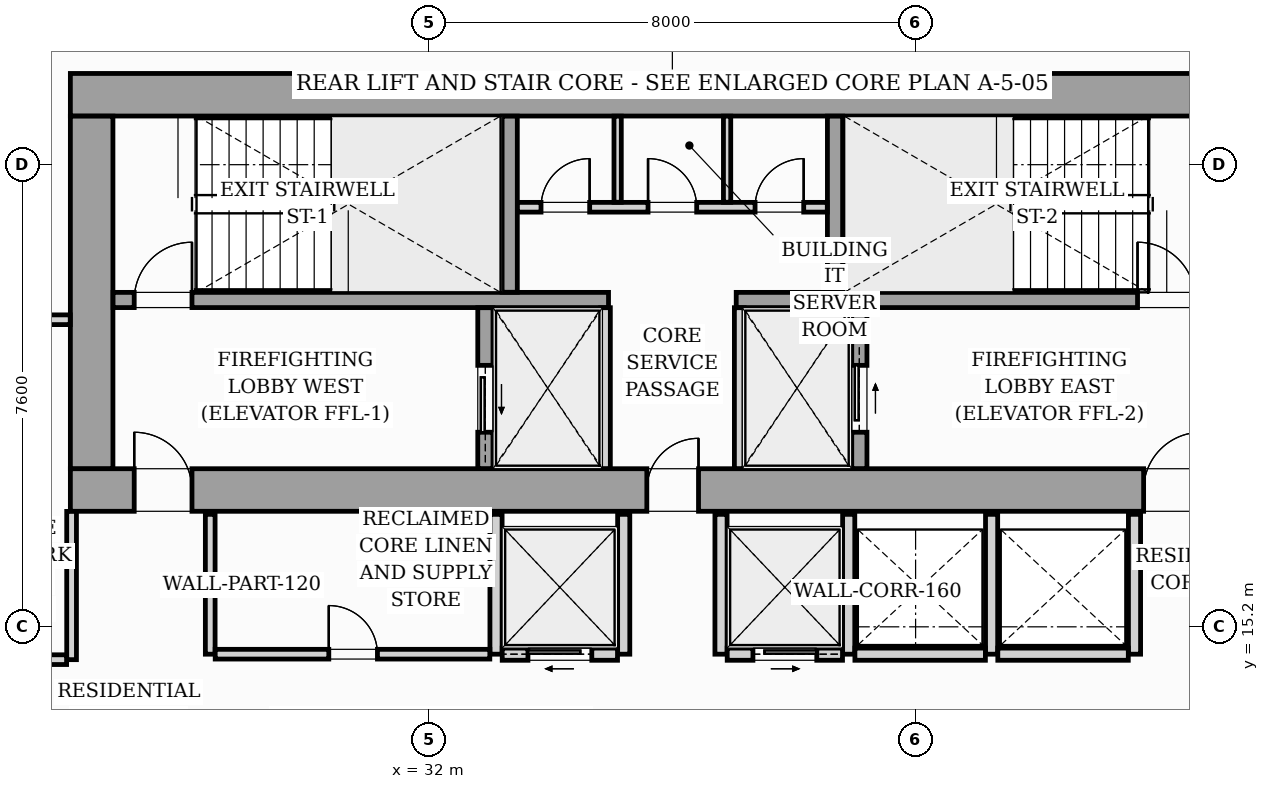
"""IFC4 building model, lengths in metres.
Left out: names, types, materials, properties, quantities, classifications, styles, units other than length and angle.
Written with IfcOpenShell. Run it as: python <this file> out.ifc"""

import sys

from ifc_helpers import new_model, si_unit, direction, frame, frame_2d, origin, origin_2d, place, context, subcontext, project, spatial, rectangle, i_section, extrude, source, transform, mapped, element, fill, save


model = new_model("IFC4")
c1 = context("Model", 3, precision=1e-05, world=origin(), true_north=direction((0.0, 1.0)))
c2 = subcontext(c1, "Body", "Model", "MODEL_VIEW")
j1 = project(units=[si_unit("LENGTHUNIT", "METRE"), si_unit("PLANEANGLEUNIT", "RADIAN")], contexts=[c1])
p1 = place(None, origin())
s1 = spatial("IfcSite", under=j1, at=p1, CompositionType="ELEMENT")
p2 = place(p1, origin())
s2 = spatial("IfcBuilding", under=s1, at=p2, CompositionType="ELEMENT")
p3 = place(p2, frame((0.0, 0.0, 137.4)))
s3 = spatial("IfcBuildingStorey", under=s2, at=p3, CompositionType="ELEMENT", Elevation=137.4)
m1 = source(origin(), c2, "Body", "SweptSolid", [
    extrude(i_section(OverallWidth=0.421, OverallDepth=0.465, WebThickness=0.045, FlangeThickness=0.073, FilletRadius=0.018, at=origin_2d()), origin(), (0.0, 0.0, 1.0), 3.196),
])
for number, where, z_axis, x_axis in (
    (1, (26.4, 17.4, 0.002), (0.0, 0.0, 1.0), (1.0, 0.0, 0.0)),
    (2, (33.12, 17.4, 0.002), (0.0, 0.0, 1.0), (1.0, 0.0, 0.0)),
    (3, (38.88, 17.4, 0.002), (0.0, 0.0, 1.0), (1.0, 0.0, 0.0)),
    (4, (26.4, 24.0, 0.002), (0.0, 0.0, 1.0), (1.0, 0.0, 0.0)),
    (5, (33.12, 24.0, 0.002), (0.0, 0.0, 1.0), (1.0, 0.0, 0.0)),
    (6, (38.88, 24.0, 0.002), (0.0, 0.0, 1.0), (1.0, 0.0, 0.0)),
):
    element("IfcColumn", number, at=place(p3, frame(where, z_axis=z_axis, x_axis=x_axis)), inside=s3, PredefinedType="PILASTER", context=c2, shape_type="MappedRepresentation", body=[
        mapped(m1, transform((0.0, 0.0, 0.0), scale=1.0)),
    ])
p4 = place(p3, frame((40.983, 25.727, 0.0), z_axis=(0.0, 0.0, 1.0), x_axis=(0.995395844771, -0.095849424686, 0.0)))
e7 = element("IfcWall", 7, at=p4, inside=s3, PredefinedType="STANDARD", context=c2, shape_type="SweptSolid", body=[
    extrude(rectangle(XDim=17.01, YDim=0.26, at=frame_2d((8.505, 0.0))), origin(), (0.0, 0.0, 1.0), 2.94),
])
p5 = place(p4, frame((8.79, 0.0, 0.0)))
e8 = element("IfcOpeningElement", 8, at=p5, cuts=e7, PredefinedType="OPENING", context=c2, shape_type="SweptSolid", body=[
    extrude(rectangle(XDim=1.8, YDim=2.06, at=frame_2d((0.9, 1.03))), frame((0.0, 0.14, 0.0), z_axis=(0.0, -1.0, 0.0), x_axis=(1.0, 0.0, 0.0)), (0.0, 0.0, 1.0), 0.28),
])
p6 = place(p4, frame((0.7, 0.0, 0.65)))
e9 = element("IfcOpeningElement", 9, at=p6, cuts=e7, PredefinedType="OPENING", context=c2, shape_type="SweptSolid", body=[
    extrude(rectangle(XDim=1.6, YDim=1.5, at=frame_2d((0.8, 0.75))), frame((0.0, 0.14, 0.0), z_axis=(0.0, -1.0, 0.0), x_axis=(1.0, 0.0, 0.0)), (0.0, 0.0, 1.0), 0.28),
])
p7 = place(p3, frame((26.1, 17.45, 0.0), z_axis=(0.0, 0.0, 1.0), x_axis=(1.0, 0.0, 0.0)))
e10 = element("IfcWall", 10, at=p7, inside=s3, PredefinedType="SHEAR", context=c2, shape_type="SweptSolid", body=[
    extrude(rectangle(XDim=19.8, YDim=0.7, at=frame_2d((9.9, 0.0))), origin(), (0.0, 0.0, 1.0), 3.2),
])
p8 = place(p7, frame((1.05, 0.0, 0.0)))
e11 = element("IfcOpeningElement", 11, at=p8, cuts=e10, PredefinedType="OPENING", context=c2, shape_type="SweptSolid", body=[
    extrude(rectangle(XDim=0.95, YDim=2.06, at=frame_2d((0.475, 1.03))), frame((0.0, 0.36, 0.0), z_axis=(0.0, -1.0, 0.0), x_axis=(1.0, 0.0, 0.0)), (0.0, 0.0, 1.0), 0.72),
])
p9 = place(p7, frame((9.48, 0.0, 0.0)))
e12 = element("IfcOpeningElement", 12, at=p9, cuts=e10, PredefinedType="OPENING", context=c2, shape_type="SweptSolid", body=[
    extrude(rectangle(XDim=0.85, YDim=2.0, at=frame_2d((0.425, 1.0))), frame((0.0, 0.36, 0.0), z_axis=(0.0, -1.0, 0.0), x_axis=(1.0, 0.0, 0.0)), (0.0, 0.0, 1.0), 0.72),
])
p10 = place(p7, frame((17.65, 0.0, 0.0)))
e13 = element("IfcOpeningElement", 13, at=p10, cuts=e10, PredefinedType="OPENING", context=c2, shape_type="SweptSolid", body=[
    extrude(rectangle(XDim=0.95, YDim=2.06, at=frame_2d((0.475, 1.03))), frame((0.0, 0.36, 0.0), z_axis=(0.0, -1.0, 0.0), x_axis=(1.0, 0.0, 0.0)), (0.0, 0.0, 1.0), 0.72),
])
p11 = place(p3, frame((26.1, 23.95, 0.0), z_axis=(0.0, 0.0, 1.0), x_axis=(1.0, 0.0, 0.0)))
e14 = element("IfcWall", 14, at=p11, inside=s3, PredefinedType="SHEAR", context=c2, shape_type="SweptSolid", body=[
    extrude(rectangle(XDim=19.8, YDim=0.7, at=frame_2d((9.9, 0.0))), origin(), (0.0, 0.0, 1.0), 3.2),
])
p12 = place(p3, frame((26.45, 17.802, 0.0), z_axis=(0.0, 0.0, 1.0), x_axis=(0.0, 1.0, 0.0)))
e15 = element("IfcWall", 15, at=p12, inside=s3, PredefinedType="SHEAR", context=c2, shape_type="SweptSolid", body=[
    extrude(rectangle(XDim=5.796, YDim=0.7, at=frame_2d((2.898, 0.0))), origin(), (0.0, 0.0, 1.0), 3.2),
])
p13 = place(p3, frame((26.802, 20.575, 0.0), z_axis=(0.0, 0.0, 1.0), x_axis=(1.0, 0.0, 0.0)))
e16 = element("IfcWall", 16, at=p13, inside=s3, PredefinedType="SOLIDWALL", context=c2, shape_type="SweptSolid", body=[
    extrude(rectangle(XDim=8.148, YDim=0.25, at=frame_2d((4.074, 0.0))), origin(), (0.0, 0.0, 1.0), 3.2),
])
p14 = place(p13, frame((0.348, 0.0, 0.0)))
e17 = element("IfcOpeningElement", 17, at=p14, cuts=e16, PredefinedType="OPENING", context=c2, shape_type="SweptSolid", body=[
    extrude(rectangle(XDim=0.95, YDim=2.06, at=frame_2d((0.475, 1.03))), frame((0.0, 0.135, 0.0), z_axis=(0.0, -1.0, 0.0), x_axis=(1.0, 0.0, 0.0)), (0.0, 0.0, 1.0), 0.27),
])
p15 = place(p3, frame((37.05, 20.575, 0.0), z_axis=(0.0, 0.0, 1.0), x_axis=(1.0, 0.0, 0.0)))
e18 = element("IfcWall", 18, at=p15, inside=s3, PredefinedType="SOLIDWALL", context=c2, shape_type="SweptSolid", body=[
    extrude(rectangle(XDim=8.148, YDim=0.25, at=frame_2d((4.074, 0.0))), origin(), (0.0, 0.0, 1.0), 3.2),
])
p16 = place(p15, frame((6.6, 0.0, 0.0)))
e19 = element("IfcOpeningElement", 19, at=p16, cuts=e18, PredefinedType="OPENING", context=c2, shape_type="SweptSolid", body=[
    extrude(rectangle(XDim=0.95, YDim=2.06, at=frame_2d((0.475, 1.03))), frame((0.0, 0.135, 0.0), z_axis=(0.0, -1.0, 0.0), x_axis=(1.0, 0.0, 0.0)), (0.0, 0.0, 1.0), 0.27),
])
for number, where, z_axis, x_axis in (
    (20, (33.325, 20.702, 0.0), (0.0, 0.0, 1.0), (0.0, 1.0, 0.0)),
    (21, (38.675, 20.702, 0.0), (0.0, 0.0, 1.0), (0.0, 1.0, 0.0)),
):
    element("IfcWall", number, at=place(p3, frame(where, z_axis=z_axis, x_axis=x_axis)), inside=s3, PredefinedType="SOLIDWALL", context=c2, shape_type="SweptSolid", body=[
        extrude(rectangle(XDim=2.896, YDim=0.25, at=frame_2d((1.448, 0.0))), origin(), (0.0, 0.0, 1.0), 3.2),
    ])
p17 = place(p3, frame((32.925, 17.802, 0.0), z_axis=(0.0, 0.0, 1.0), x_axis=(0.0, 1.0, 0.0)))
e22 = element("IfcWall", 22, at=p17, inside=s3, PredefinedType="SOLIDWALL", context=c2, shape_type="SweptSolid", body=[
    extrude(rectangle(XDim=2.646, YDim=0.25, at=frame_2d((1.323, 0.0))), origin(), (0.0, 0.0, 1.0), 3.2),
])
p18 = place(p17, frame((0.598, 0.0, 0.0)))
e23 = element("IfcOpeningElement", 23, at=p18, cuts=e22, PredefinedType="OPENING", context=c2, shape_type="SweptSolid", body=[
    extrude(rectangle(XDim=1.1, YDim=2.08, at=frame_2d((0.55, 1.04))), frame((0.0, 0.135, 0.0), z_axis=(0.0, -1.0, 0.0), x_axis=(1.0, 0.0, 0.0)), (0.0, 0.0, 1.0), 0.27),
])
for number, where, z_axis, x_axis in (
    (24, (34.9, 17.802, 0.0), (0.0, 0.0, 1.0), (0.0, 1.0, 0.0)),
    (25, (37.1, 17.802, 0.0), (0.0, 0.0, 1.0), (0.0, 1.0, 0.0)),
):
    element("IfcWall", number, at=place(p3, frame(where, z_axis=z_axis, x_axis=x_axis)), inside=s3, PredefinedType="PARTITIONING", context=c2, shape_type="SweptSolid", body=[
        extrude(rectangle(XDim=2.646, YDim=0.16, at=frame_2d((1.323, 0.0))), origin(), (0.0, 0.0, 1.0), 2.94),
    ])
p19 = place(p3, frame((39.075, 17.802, 0.0), z_axis=(0.0, 0.0, 1.0), x_axis=(0.0, 1.0, 0.0)))
e26 = element("IfcWall", 26, at=p19, inside=s3, PredefinedType="SOLIDWALL", context=c2, shape_type="SweptSolid", body=[
    extrude(rectangle(XDim=2.646, YDim=0.25, at=frame_2d((1.323, 0.0))), origin(), (0.0, 0.0, 1.0), 3.2),
])
p20 = place(p19, frame((0.598, 0.0, 0.0)))
e27 = element("IfcOpeningElement", 27, at=p20, cuts=e26, PredefinedType="OPENING", context=c2, shape_type="SweptSolid", body=[
    extrude(rectangle(XDim=1.1, YDim=2.08, at=frame_2d((0.55, 1.04))), frame((0.0, 0.135, 0.0), z_axis=(0.0, -1.0, 0.0), x_axis=(1.0, 0.0, 0.0)), (0.0, 0.0, 1.0), 0.27),
])
p21 = place(p3, frame((33.452, 22.1, 0.0), z_axis=(0.0, 0.0, 1.0), x_axis=(1.0, 0.0, 0.0)))
e28 = element("IfcWall", 28, at=p21, inside=s3, PredefinedType="PARTITIONING", context=c2, shape_type="SweptSolid", body=[
    extrude(rectangle(XDim=5.096, YDim=0.16, at=frame_2d((2.548, 0.0))), origin(), (0.0, 0.0, 1.0), 2.94),
])
p22 = place(p21, frame((0.388, 0.0, 0.0)))
e29 = element("IfcOpeningElement", 29, at=p22, cuts=e28, PredefinedType="OPENING", context=c2, shape_type="SweptSolid", body=[
    extrude(rectangle(XDim=0.8, YDim=2.05, at=frame_2d((0.4, 1.025))), frame((0.0, 0.09, 0.0), z_axis=(0.0, -1.0, 0.0), x_axis=(1.0, 0.0, 0.0)), (0.0, 0.0, 1.0), 0.18),
])
p23 = place(p21, frame((2.148, 0.0, 0.0)))
e30 = element("IfcOpeningElement", 30, at=p23, cuts=e28, PredefinedType="OPENING", context=c2, shape_type="SweptSolid", body=[
    extrude(rectangle(XDim=0.8, YDim=2.05, at=frame_2d((0.4, 1.025))), frame((0.0, 0.09, 0.0), z_axis=(0.0, -1.0, 0.0), x_axis=(1.0, 0.0, 0.0)), (0.0, 0.0, 1.0), 0.18),
])
p24 = place(p21, frame((3.908, 0.0, 0.0)))
e31 = element("IfcOpeningElement", 31, at=p24, cuts=e28, PredefinedType="OPENING", context=c2, shape_type="SweptSolid", body=[
    extrude(rectangle(XDim=0.8, YDim=2.05, at=frame_2d((0.4, 1.025))), frame((0.0, 0.09, 0.0), z_axis=(0.0, -1.0, 0.0), x_axis=(1.0, 0.0, 0.0)), (0.0, 0.0, 1.0), 0.18),
])
for number, where, z_axis, x_axis in (
    (32, (35.1, 22.182, 0.0), (0.0, 0.0, 1.0), (0.0, 1.0, 0.0)),
    (33, (36.9, 22.182, 0.0), (0.0, 0.0, 1.0), (0.0, 1.0, 0.0)),
):
    element("IfcWall", number, at=place(p3, frame(where, z_axis=z_axis, x_axis=x_axis)), inside=s3, PredefinedType="PARTITIONING", context=c2, shape_type="SweptSolid", body=[
        extrude(rectangle(XDim=1.416, YDim=0.12, at=frame_2d((0.708, 0.0))), origin(), (0.0, 0.0, 1.0), 2.94),
    ])
p25 = place(p3, frame((28.4, 14.75, 0.0), z_axis=(0.0, 0.0, 1.0), x_axis=(0.0, 1.0, 0.0)))
e34 = element("IfcWall", 34, at=p25, inside=s3, PredefinedType="PARTITIONING", context=c2, shape_type="SweptSolid", body=[
    extrude(rectangle(XDim=2.3, YDim=0.16, at=frame_2d((1.15, 0.0))), origin(), (0.0, 0.0, 1.0), 2.94),
])
p26 = place(p3, frame((33.1, 14.75, 0.0), z_axis=(0.0, 0.0, 1.0), x_axis=(0.0, 1.0, 0.0)))
e35 = element("IfcWall", 35, at=p26, inside=s3, PredefinedType="PARTITIONING", context=c2, shape_type="SweptSolid", body=[
    extrude(rectangle(XDim=2.3, YDim=0.2, at=frame_2d((1.15, 0.0))), origin(), (0.0, 0.0, 1.0), 2.94),
])
p27 = place(p3, frame((28.482, 14.75, 0.0), z_axis=(0.0, 0.0, 1.0), x_axis=(1.0, 0.0, 0.0)))
e36 = element("IfcWall", 36, at=p27, inside=s3, PredefinedType="PARTITIONING", context=c2, shape_type="SweptSolid", body=[
    extrude(rectangle(XDim=4.516, YDim=0.16, at=frame_2d((2.258, 0.0))), origin(), (0.0, 0.0, 1.0), 2.94),
])
p28 = place(p27, frame((1.868, 0.0, 0.0)))
e37 = element("IfcOpeningElement", 37, at=p28, cuts=e36, PredefinedType="OPENING", context=c2, shape_type="SweptSolid", body=[
    extrude(rectangle(XDim=0.8, YDim=2.05, at=frame_2d((0.4, 1.025))), frame((0.0, 0.09, 0.0), z_axis=(0.0, -1.0, 0.0), x_axis=(1.0, 0.0, 0.0)), (0.0, 0.0, 1.0), 0.18),
])
p29 = place(p3, frame((35.2, 14.75, 0.0), z_axis=(0.0, 0.0, 1.0), x_axis=(0.0, 1.0, 0.0)))
e38 = element("IfcWall", 38, at=p29, inside=s3, PredefinedType="PARTITIONING", context=c2, shape_type="SweptSolid", body=[
    extrude(rectangle(XDim=2.3, YDim=0.2, at=frame_2d((1.15, 0.0))), origin(), (0.0, 0.0, 1.0), 2.94),
])
p30 = place(p3, frame((33.202, 14.75, 0.0), z_axis=(0.0, 0.0, 1.0), x_axis=(1.0, 0.0, 0.0)))
e39 = element("IfcWall", 39, at=p30, inside=s3, PredefinedType="PARTITIONING", context=c2, shape_type="SweptSolid", body=[
    extrude(rectangle(XDim=1.896, YDim=0.2, at=frame_2d((0.948, 0.0))), origin(), (0.0, 0.0, 1.0), 2.94),
])
p31 = place(p30, frame((0.423, 0.0, 0.0)))
e40 = element("IfcOpeningElement", 40, at=p31, cuts=e39, PredefinedType="OPENING", context=c2, shape_type="SweptSolid", body=[
    extrude(rectangle(XDim=1.05, YDim=2.08, at=frame_2d((0.525, 1.04))), frame((0.0, 0.11, 0.0), z_axis=(0.0, -1.0, 0.0), x_axis=(1.0, 0.0, 0.0)), (0.0, 0.0, 1.0), 0.22),
])
for number, where, z_axis, x_axis in (
    (41, (36.8, 14.75, 0.0), (0.0, 0.0, 1.0), (0.0, 1.0, 0.0)),
    (42, (38.9, 14.75, 0.0), (0.0, 0.0, 1.0), (0.0, 1.0, 0.0)),
):
    element("IfcWall", number, at=place(p3, frame(where, z_axis=z_axis, x_axis=x_axis)), inside=s3, PredefinedType="PARTITIONING", context=c2, shape_type="SweptSolid", body=[
        extrude(rectangle(XDim=2.3, YDim=0.2, at=frame_2d((1.15, 0.0))), origin(), (0.0, 0.0, 1.0), 2.94),
    ])
p32 = place(p3, frame((36.902, 14.75, 0.0), z_axis=(0.0, 0.0, 1.0), x_axis=(1.0, 0.0, 0.0)))
e43 = element("IfcWall", 43, at=p32, inside=s3, PredefinedType="PARTITIONING", context=c2, shape_type="SweptSolid", body=[
    extrude(rectangle(XDim=1.896, YDim=0.2, at=frame_2d((0.948, 0.0))), origin(), (0.0, 0.0, 1.0), 2.94),
])
p33 = place(p32, frame((0.423, 0.0, 0.0)))
e44 = element("IfcOpeningElement", 44, at=p33, cuts=e43, PredefinedType="OPENING", context=c2, shape_type="SweptSolid", body=[
    extrude(rectangle(XDim=1.05, YDim=2.08, at=frame_2d((0.525, 1.04))), frame((0.0, 0.11, 0.0), z_axis=(0.0, -1.0, 0.0), x_axis=(1.0, 0.0, 0.0)), (0.0, 0.0, 1.0), 0.22),
])
for number, where, z_axis, x_axis in (
    (45, (41.25, 14.75, 0.0), (0.0, 0.0, 1.0), (0.0, 1.0, 0.0)),
    (46, (43.6, 14.75, 0.0), (0.0, 0.0, 1.0), (0.0, 1.0, 0.0)),
):
    element("IfcWall", number, at=place(p3, frame(where, z_axis=z_axis, x_axis=x_axis)), inside=s3, PredefinedType="PARTITIONING", context=c2, shape_type="SweptSolid", body=[
        extrude(rectangle(XDim=2.3, YDim=0.2, at=frame_2d((1.15, 0.0))), origin(), (0.0, 0.0, 1.0), 2.94),
    ])
for number, where, z_axis, x_axis in (
    (47, (39.002, 14.75, 0.0), (0.0, 0.0, 1.0), (1.0, 0.0, 0.0)),
    (48, (41.352, 14.75, 0.0), (0.0, 0.0, 1.0), (1.0, 0.0, 0.0)),
):
    element("IfcWall", number, at=place(p3, frame(where, z_axis=z_axis, x_axis=x_axis)), inside=s3, PredefinedType="PARTITIONING", context=c2, shape_type="SweptSolid", body=[
        extrude(rectangle(XDim=2.146, YDim=0.2, at=frame_2d((1.073, 0.0))), origin(), (0.0, 0.0, 1.0), 2.94),
    ])
p34 = place(p3, frame((24.182, 20.25, 0.0), z_axis=(0.0, 0.0, 1.0), x_axis=(1.0, 0.0, 0.0)))
e49 = element("IfcWall", 49, at=p34, inside=s3, PredefinedType="PARTITIONING", context=c2, shape_type="SweptSolid", body=[
    extrude(rectangle(XDim=1.916, YDim=0.16, at=frame_2d((0.958, 0.0))), origin(), (0.0, 0.0, 1.0), 2.94),
])
p35 = place(p3, frame((26.12, 14.66, 0.0), z_axis=(0.0, 0.0, 1.0), x_axis=(0.0, 1.0, 0.0)))
e50 = element("IfcWall", 50, at=p35, inside=s3, PredefinedType="PARTITIONING", context=c2, shape_type="SweptSolid", body=[
    extrude(rectangle(XDim=2.438, YDim=0.16, at=frame_2d((1.219, 0.0))), origin(), (0.0, 0.0, 1.0), 2.94),
])
p36 = place(p3, frame((24.182, 14.66, 0.0), z_axis=(0.0, 0.0, 1.0), x_axis=(1.0, 0.0, 0.0)))
e51 = element("IfcWall", 51, at=p36, inside=s3, PredefinedType="PARTITIONING", context=c2, shape_type="SweptSolid", body=[
    extrude(rectangle(XDim=1.856, YDim=0.16, at=frame_2d((0.928, 0.0))), origin(), (0.0, 0.0, 1.0), 2.94),
])
m2 = source(origin(), c2, "Body", "SweptSolid", [
    extrude(rectangle(XDim=0.95, YDim=2.06, at=frame_2d((0.475, 1.03))), frame((0.0, 0.025, 0.0), z_axis=(0.0, -1.0, 0.0), x_axis=(1.0, 0.0, 0.0)), (0.0, 0.0, 1.0), 0.05),
])
p37 = place(p8, origin())
e52 = element("IfcDoor", 52, at=p37, inside=s3, OperationType="SINGLE_SWING_LEFT", PredefinedType="DOOR", context=c2, shape_type="MappedRepresentation", body=[
    mapped(m2, transform((0.0, 0.0, 0.0), scale=1.0)),
])
fill(e11, e52)
m3 = source(origin(), c2, "Body", "SweptSolid", [
    extrude(rectangle(XDim=0.85, YDim=2.0, at=frame_2d((0.425, 1.0))), frame((0.0, 0.025, 0.0), z_axis=(0.0, -1.0, 0.0), x_axis=(1.0, 0.0, 0.0)), (0.0, 0.0, 1.0), 0.05),
])
p38 = place(p9, origin())
e53 = element("IfcDoor", 53, at=p38, inside=s3, OperationType="SINGLE_SWING_RIGHT", PredefinedType="DOOR", context=c2, shape_type="MappedRepresentation", body=[
    mapped(m3, transform((0.0, 0.0, 0.0), scale=1.0)),
])
fill(e12, e53)
p39 = place(p10, origin())
e54 = element("IfcDoor", 54, at=p39, inside=s3, OperationType="SINGLE_SWING_RIGHT", PredefinedType="DOOR", context=c2, shape_type="MappedRepresentation", body=[
    mapped(m2, transform((0.0, 0.0, 0.0), scale=1.0)),
])
fill(e13, e54)
p40 = place(p14, origin())
e55 = element("IfcDoor", 55, at=p40, inside=s3, OperationType="SINGLE_SWING_RIGHT", PredefinedType="DOOR", context=c2, shape_type="MappedRepresentation", body=[
    mapped(m2, transform((0.0, 0.0, 0.0), scale=1.0)),
])
fill(e17, e55)
p41 = place(p16, origin())
e56 = element("IfcDoor", 56, at=p41, inside=s3, OperationType="SINGLE_SWING_LEFT", PredefinedType="DOOR", context=c2, shape_type="MappedRepresentation", body=[
    mapped(m2, transform((0.0, 0.0, 0.0), scale=1.0)),
])
fill(e19, e56)
m4 = source(origin(), c2, "Body", "SweptSolid", [
    extrude(rectangle(XDim=1.1, YDim=2.08, at=frame_2d((0.55, 1.04))), frame((0.0, 0.025, 0.0), z_axis=(0.0, -1.0, 0.0), x_axis=(1.0, 0.0, 0.0)), (0.0, 0.0, 1.0), 0.05),
])
p42 = place(p18, origin())
e57 = element("IfcDoor", 57, at=p42, inside=s3, OperationType="SLIDING_TO_LEFT", PredefinedType="DOOR", context=c2, shape_type="MappedRepresentation", body=[
    mapped(m4, transform((0.0, 0.0, 0.0), scale=1.0)),
])
fill(e23, e57)
p43 = place(p20, origin())
e58 = element("IfcDoor", 58, at=p43, inside=s3, OperationType="SLIDING_TO_RIGHT", PredefinedType="DOOR", context=c2, shape_type="MappedRepresentation", body=[
    mapped(m4, transform((0.0, 0.0, 0.0), scale=1.0)),
])
fill(e27, e58)
m5 = source(origin(), c2, "Body", "SweptSolid", [
    extrude(rectangle(XDim=0.8, YDim=2.05, at=frame_2d((0.4, 1.025))), frame((0.0, 0.025, 0.0), z_axis=(0.0, -1.0, 0.0), x_axis=(1.0, 0.0, 0.0)), (0.0, 0.0, 1.0), 0.05),
])
p44 = place(p22, origin())
e59 = element("IfcDoor", 59, at=p44, inside=s3, OperationType="SINGLE_SWING_RIGHT", PredefinedType="DOOR", context=c2, shape_type="MappedRepresentation", body=[
    mapped(m5, transform((0.0, 0.0, 0.0), scale=1.0)),
])
fill(e29, e59)
p45 = place(p23, origin())
e60 = element("IfcDoor", 60, at=p45, inside=s3, OperationType="SINGLE_SWING_LEFT", PredefinedType="DOOR", context=c2, shape_type="MappedRepresentation", body=[
    mapped(m5, transform((0.0, 0.0, 0.0), scale=1.0)),
])
fill(e30, e60)
p46 = place(p24, origin())
e61 = element("IfcDoor", 61, at=p46, inside=s3, OperationType="SINGLE_SWING_RIGHT", PredefinedType="DOOR", context=c2, shape_type="MappedRepresentation", body=[
    mapped(m5, transform((0.0, 0.0, 0.0), scale=1.0)),
])
fill(e31, e61)
p47 = place(p28, origin())
e62 = element("IfcDoor", 62, at=p47, inside=s3, OperationType="SINGLE_SWING_LEFT", PredefinedType="DOOR", context=c2, shape_type="MappedRepresentation", body=[
    mapped(m5, transform((0.0, 0.0, 0.0), scale=1.0)),
])
fill(e37, e62)
m6 = source(origin(), c2, "Body", "SweptSolid", [
    extrude(rectangle(XDim=1.05, YDim=2.08, at=frame_2d((0.525, 1.04))), frame((0.0, 0.025, 0.0), z_axis=(0.0, -1.0, 0.0), x_axis=(1.0, 0.0, 0.0)), (0.0, 0.0, 1.0), 0.05),
])
p48 = place(p31, origin())
e63 = element("IfcDoor", 63, at=p48, inside=s3, OperationType="SLIDING_TO_LEFT", PredefinedType="DOOR", context=c2, shape_type="MappedRepresentation", body=[
    mapped(m6, transform((0.0, 0.0, 0.0), scale=1.0)),
])
fill(e40, e63)
p49 = place(p33, origin())
e64 = element("IfcDoor", 64, at=p49, inside=s3, OperationType="SLIDING_TO_RIGHT", PredefinedType="DOOR", context=c2, shape_type="MappedRepresentation", body=[
    mapped(m6, transform((0.0, 0.0, 0.0), scale=1.0)),
])
fill(e44, e64)
save(model, sys.argv[1])
